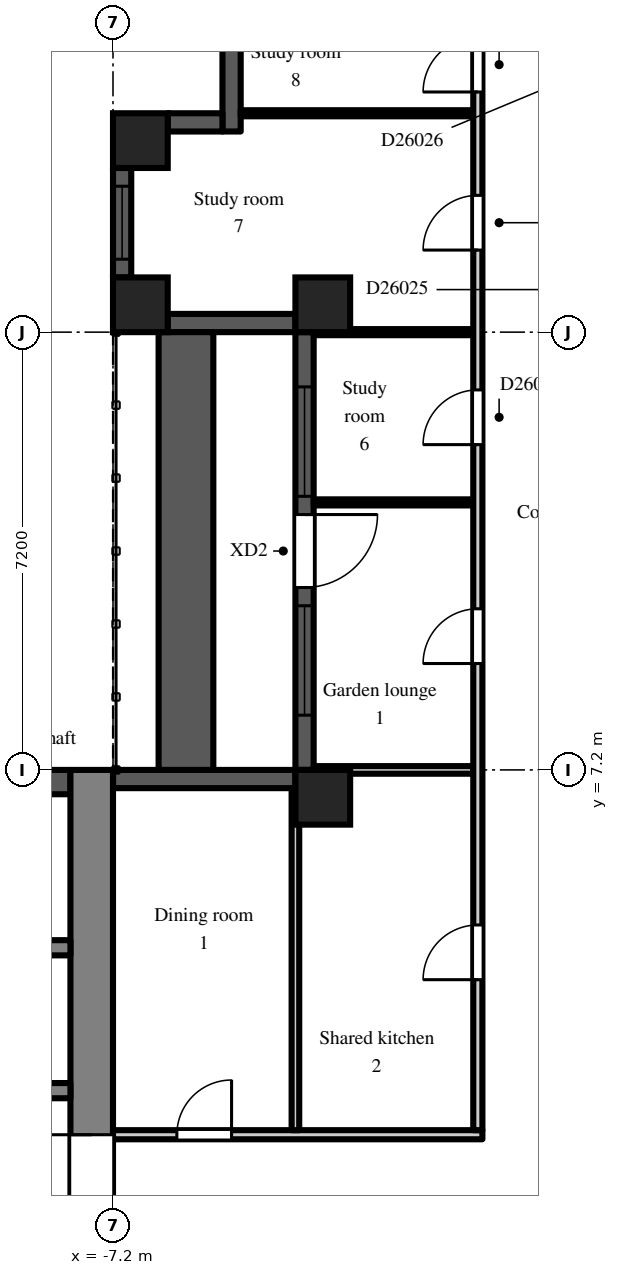
"""IFC4 building model, lengths in metres.
Left out: names, types, materials, properties, quantities, classifications, styles, units other than length and angle.
Written with IfcOpenShell. Run it as: python <this file> out.ifc"""

import sys

from ifc_helpers import new_model, si_unit, direction, frame, frame_2d, origin, origin_2d, place, context, subcontext, project, spatial, rectangle, extrude, element, fill, save


model = new_model("IFC4")
c1 = context("Model", 3, precision=1e-05, world=origin(), true_north=direction((0.0, 1.0)))
c2 = subcontext(c1, "Body", "Model", "MODEL_VIEW")
j1 = project(units=[si_unit("LENGTHUNIT", "METRE"), si_unit("PLANEANGLEUNIT", "RADIAN")], contexts=[c1])
p1 = place(None, origin())
s1 = spatial("IfcSite", under=j1, at=p1, CompositionType="ELEMENT")
p2 = place(p1, origin())
s2 = spatial("IfcBuilding", under=s1, at=p2, CompositionType="ELEMENT")
p3 = place(p2, frame((0.0, 0.0, 179.7)))
s3 = spatial("IfcBuildingStorey", under=s2, at=p3, CompositionType="ELEMENT", Elevation=179.7)
for number, where, z_axis, x_axis in (
    (1, (-6.75, 14.85, 0.0), (0.0, 0.0, 1.0), (1.0, 0.0, 0.0)),
    (2, (-6.75, 17.55, 0.0), (0.0, 0.0, 1.0), (1.0, 0.0, 0.0)),
    (3, (-3.75, 6.75, 0.0), (0.0, 0.0, 1.0), (1.0, 0.0, 0.0)),
    (4, (-3.75, 14.85, 0.0), (0.0, 0.0, 1.0), (1.0, 0.0, 0.0)),
):
    element("IfcColumn", number, at=place(p3, frame(where, z_axis=z_axis, x_axis=x_axis)), inside=s3, PredefinedType="COLUMN", context=c2, shape_type="SweptSolid", body=[
        extrude(rectangle(XDim=0.9, YDim=0.9, at=origin_2d()), origin(), (0.0, 0.0, 1.0), 3.0),
    ])
p4 = place(p3, frame((-5.25, 19.5, 0.0), z_axis=(0.0, 0.0, 1.0), x_axis=(0.0, -1.0, 0.0)))
e5 = element("IfcWall", 5, at=p4, inside=s3, PredefinedType="SOLIDWALL", context=c2, shape_type="SweptSolid", body=[
    extrude(rectangle(XDim=1.8, YDim=0.3, at=frame_2d((0.9, 0.0))), origin(), (0.0, 0.0, 1.0), 2.6),
])
p5 = place(p3, frame((-5.4, 17.85, 0.0), z_axis=(0.0, 0.0, 1.0), x_axis=(-1.0, 0.0, 0.0)))
e6 = element("IfcWall", 6, at=p5, inside=s3, PredefinedType="SOLIDWALL", context=c2, shape_type="SweptSolid", body=[
    extrude(rectangle(XDim=0.9, YDim=0.3, at=frame_2d((0.45, 0.0))), origin(), (0.0, 0.0, 1.0), 2.6),
])
p6 = place(p3, frame((-7.05, 17.1, 0.0), z_axis=(0.0, 0.0, 1.0), x_axis=(0.0, -1.0, 0.0)))
e7 = element("IfcWall", 7, at=p6, inside=s3, PredefinedType="SOLIDWALL", context=c2, shape_type="SweptSolid", body=[
    extrude(rectangle(XDim=1.8, YDim=0.3, at=frame_2d((0.9, 0.0))), origin(), (0.0, 0.0, 1.0), 2.2),
])
p7 = place(p6, frame((0.3, 0.0, 0.2)))
e8 = element("IfcOpeningElement", 8, at=p7, cuts=e7, PredefinedType="OPENING", context=c2, shape_type="SweptSolid", body=[
    extrude(rectangle(XDim=1.2, YDim=1.85, at=frame_2d((0.6, 0.925))), frame((0.0, 0.16, 0.0), z_axis=(0.0, -1.0, 0.0), x_axis=(1.0, 0.0, 0.0)), (0.0, 0.0, 1.0), 0.32),
])
p8 = place(p3, frame((-6.3, 14.55, 0.0), z_axis=(0.0, 0.0, 1.0), x_axis=(1.0, 0.0, 0.0)))
e9 = element("IfcWall", 9, at=p8, inside=s3, PredefinedType="SOLIDWALL", context=c2, shape_type="SweptSolid", body=[
    extrude(rectangle(XDim=2.1, YDim=0.3, at=frame_2d((1.05, 0.0))), origin(), (0.0, 0.0, 1.0), 2.2),
])
p9 = place(p3, frame((-4.05, 14.4, 0.0), z_axis=(0.0, 0.0, 1.0), x_axis=(0.0, -1.0, 0.0)))
e10 = element("IfcWall", 10, at=p9, inside=s3, PredefinedType="SOLIDWALL", context=c2, shape_type="SweptSolid", body=[
    extrude(rectangle(XDim=7.2, YDim=0.3, at=frame_2d((3.6, 0.0))), origin(), (0.0, 0.0, 1.0), 2.2),
])
p10 = place(p9, frame((3.0, 0.0, 0.0)))
e11 = element("IfcOpeningElement", 11, at=p10, cuts=e10, PredefinedType="OPENING", context=c2, shape_type="SweptSolid", body=[
    extrude(rectangle(XDim=1.2, YDim=2.05, at=frame_2d((0.6, 1.025))), frame((0.0, 0.16, 0.0), z_axis=(0.0, -1.0, 0.0), x_axis=(1.0, 0.0, 0.0)), (0.0, 0.0, 1.0), 0.32),
])
p11 = place(p9, frame((0.9, 0.0, 0.2)))
e12 = element("IfcOpeningElement", 12, at=p11, cuts=e10, PredefinedType="OPENING", context=c2, shape_type="SweptSolid", body=[
    extrude(rectangle(XDim=1.8, YDim=1.85, at=frame_2d((0.9, 0.925))), frame((0.0, 0.16, 0.0), z_axis=(0.0, -1.0, 0.0), x_axis=(1.0, 0.0, 0.0)), (0.0, 0.0, 1.0), 0.32),
])
p12 = place(p9, frame((4.5, 0.0, 0.2)))
e13 = element("IfcOpeningElement", 13, at=p12, cuts=e10, PredefinedType="OPENING", context=c2, shape_type="SweptSolid", body=[
    extrude(rectangle(XDim=1.8, YDim=1.85, at=frame_2d((0.9, 0.925))), frame((0.0, 0.16, 0.0), z_axis=(0.0, -1.0, 0.0), x_axis=(1.0, 0.0, 0.0)), (0.0, 0.0, 1.0), 0.32),
])
p13 = place(p3, frame((-4.2, 7.05, 0.0), z_axis=(0.0, 0.0, 1.0), x_axis=(-1.0, 0.0, 0.0)))
e14 = element("IfcWall", 14, at=p13, inside=s3, PredefinedType="SOLIDWALL", context=c2, shape_type="SweptSolid", body=[
    extrude(rectangle(XDim=3.0, YDim=0.3, at=frame_2d((1.5, 0.0))), origin(), (0.0, 0.0, 1.0), 2.2),
])
p14 = place(p3, frame((-6.0, 7.2, 0.0), z_axis=(0.0, 0.0, 1.0), x_axis=(0.0, 1.0, 0.0)))
e15 = element("IfcWall", 15, at=p14, inside=s3, PredefinedType="PARAPET", context=c2, shape_type="SweptSolid", body=[
    extrude(rectangle(XDim=7.2, YDim=0.9, at=frame_2d((3.6, 0.0))), origin(), (0.0, 0.0, 1.0), 0.8),
])
p15 = place(p3, frame((-7.55, -7.2, 0.0), z_axis=(0.0, 0.0, 1.0), x_axis=(0.0, 1.0, 0.0)))
e16 = element("IfcWall", 16, at=p15, inside=s3, PredefinedType="SHEAR", context=c2, shape_type="SweptSolid", body=[
    extrude(rectangle(XDim=14.4, YDim=0.7, at=frame_2d((7.2, 0.0))), origin(), (0.0, 0.0, 1.0), 2.6),
])
p16 = place(p15, frame((6.0, 0.0, 0.0)))
e17 = element("IfcOpeningElement", 17, at=p16, cuts=e16, PredefinedType="OPENING", context=c2, shape_type="SweptSolid", body=[
    extrude(rectangle(XDim=2.4, YDim=2.2, at=frame_2d((1.2, 1.1))), frame((0.0, 0.36, 0.0), z_axis=(0.0, -1.0, 0.0), x_axis=(1.0, 0.0, 0.0)), (0.0, 0.0, 1.0), 0.72),
])
p17 = place(p3, frame((-7.9, 7.0, 0.0), z_axis=(0.0, 0.0, 1.0), x_axis=(-1.0, 0.0, 0.0)))
e18 = element("IfcWall", 18, at=p17, inside=s3, PredefinedType="SHEAR", context=c2, shape_type="SweptSolid", body=[
    extrude(rectangle(XDim=12.95, YDim=0.4, at=frame_2d((6.475, 0.0))), origin(), (0.0, 0.0, 1.0), 2.6),
])
p18 = place(p3, frame((-7.9, 1.925, 0.0), z_axis=(0.0, 0.0, 1.0), x_axis=(-1.0, 0.0, 0.0)))
e19 = element("IfcWall", 19, at=p18, inside=s3, PredefinedType="SHEAR", context=c2, shape_type="SweptSolid", body=[
    extrude(rectangle(XDim=12.95, YDim=0.25, at=frame_2d((6.475, 0.0))), origin(), (0.0, 0.0, 1.0), 2.6),
])
p19 = place(p18, frame((4.825, 0.0, 0.0)))
e20 = element("IfcOpeningElement", 20, at=p19, cuts=e19, PredefinedType="OPENING", context=c2, shape_type="SweptSolid", body=[
    extrude(rectangle(XDim=1.1, YDim=2.1, at=frame_2d((0.55, 1.05))), frame((0.0, 0.135, 0.0), z_axis=(0.0, -1.0, 0.0), x_axis=(1.0, 0.0, 0.0)), (0.0, 0.0, 1.0), 0.27),
])
p20 = place(p18, frame((7.025, 0.0, 0.0)))
e21 = element("IfcOpeningElement", 21, at=p20, cuts=e19, PredefinedType="OPENING", context=c2, shape_type="SweptSolid", body=[
    extrude(rectangle(XDim=1.1, YDim=2.1, at=frame_2d((0.55, 1.05))), frame((0.0, 0.135, 0.0), z_axis=(0.0, -1.0, 0.0), x_axis=(1.0, 0.0, 0.0)), (0.0, 0.0, 1.0), 0.27),
])
p21 = place(p18, frame((9.225, 0.0, 0.0)))
e22 = element("IfcOpeningElement", 22, at=p21, cuts=e19, PredefinedType="OPENING", context=c2, shape_type="SweptSolid", body=[
    extrude(rectangle(XDim=1.1, YDim=2.1, at=frame_2d((0.55, 1.05))), frame((0.0, 0.135, 0.0), z_axis=(0.0, -1.0, 0.0), x_axis=(1.0, 0.0, 0.0)), (0.0, 0.0, 1.0), 0.27),
])
p22 = place(p18, frame((0.525, 0.0, 0.0)))
e23 = element("IfcOpeningElement", 23, at=p22, cuts=e19, PredefinedType="OPENING", context=c2, shape_type="SweptSolid", body=[
    extrude(rectangle(XDim=0.9, YDim=2.1, at=frame_2d((0.45, 1.05))), frame((0.0, 0.135, 0.0), z_axis=(0.0, -1.0, 0.0), x_axis=(1.0, 0.0, 0.0)), (0.0, 0.0, 1.0), 0.27),
])
p23 = place(p18, frame((2.625, 0.0, 0.0)))
e24 = element("IfcOpeningElement", 24, at=p23, cuts=e19, PredefinedType="OPENING", context=c2, shape_type="SweptSolid", body=[
    extrude(rectangle(XDim=1.1, YDim=2.1, at=frame_2d((0.55, 1.05))), frame((0.0, 0.135, 0.0), z_axis=(0.0, -1.0, 0.0), x_axis=(1.0, 0.0, 0.0)), (0.0, 0.0, 1.0), 0.27),
])
p24 = place(p18, frame((11.525, 0.0, 0.0)))
e25 = element("IfcOpeningElement", 25, at=p24, cuts=e19, PredefinedType="OPENING", context=c2, shape_type="SweptSolid", body=[
    extrude(rectangle(XDim=0.9, YDim=2.1, at=frame_2d((0.45, 1.05))), frame((0.0, 0.135, 0.0), z_axis=(0.0, -1.0, 0.0), x_axis=(1.0, 0.0, 0.0)), (0.0, 0.0, 1.0), 0.27),
])
p25 = place(p3, frame((-7.9, 4.275, 0.0), z_axis=(0.0, 0.0, 1.0), x_axis=(-1.0, 0.0, 0.0)))
e26 = element("IfcWall", 26, at=p25, inside=s3, PredefinedType="SHEAR", context=c2, shape_type="SweptSolid", body=[
    extrude(rectangle(XDim=1.95, YDim=0.25, at=frame_2d((0.975, 0.0))), origin(), (0.0, 0.0, 1.0), 2.6),
])
p26 = place(p3, frame((-7.2, 1.2, 0.0), z_axis=(0.0, 0.0, 1.0), x_axis=(1.0, 0.0, 0.0)))
e27 = element("IfcWall", 27, at=p26, inside=s3, PredefinedType="PARTITIONING", context=c2, shape_type="SweptSolid", body=[
    extrude(rectangle(XDim=6.075, YDim=0.15, at=frame_2d((3.038, 0.0))), origin(), (0.0, 0.0, 1.0), 2.6),
])
p27 = place(p26, frame((1.05, 0.0, 0.0)))
e28 = element("IfcOpeningElement", 28, at=p27, cuts=e27, PredefinedType="OPENING", context=c2, shape_type="SweptSolid", body=[
    extrude(rectangle(XDim=0.9, YDim=2.1, at=frame_2d((0.45, 1.05))), frame((0.0, 0.085, 0.0), z_axis=(0.0, -1.0, 0.0), x_axis=(1.0, 0.0, 0.0)), (0.0, 0.0, 1.0), 0.17),
])
p28 = place(p3, frame((-5.1, 18.0, 0.0), z_axis=(0.0, 0.0, 1.0), x_axis=(1.0, 0.0, 0.0)))
e29 = element("IfcWall", 29, at=p28, inside=s3, PredefinedType="PARTITIONING", context=c2, shape_type="SweptSolid", body=[
    extrude(rectangle(XDim=3.825, YDim=0.1, at=frame_2d((1.913, 0.0))), origin(), (0.0, 0.0, 1.0), 2.6),
])
p29 = place(p3, frame((-4.2, 1.275, 0.0), z_axis=(0.0, 0.0, 1.0), x_axis=(0.0, 1.0, 0.0)))
e30 = element("IfcWall", 30, at=p29, inside=s3, PredefinedType="PARTITIONING", context=c2, shape_type="SweptSolid", body=[
    extrude(rectangle(XDim=5.625, YDim=0.125, at=frame_2d((2.812, 0.0))), origin(), (0.0, 0.0, 1.0), 2.6),
])
p30 = place(p3, frame((-3.9, 7.2, 0.0), z_axis=(0.0, 0.0, 1.0), x_axis=(1.0, 0.0, 0.0)))
e31 = element("IfcWall", 31, at=p30, inside=s3, PredefinedType="PARTITIONING", context=c2, shape_type="SweptSolid", body=[
    extrude(rectangle(XDim=2.625, YDim=0.125, at=frame_2d((1.312, 0.0))), origin(), (0.0, 0.0, 1.0), 2.6),
])
for number, where, z_axis, x_axis in (
    (32, (-3.9, 11.6, 0.0), (0.0, 0.0, 1.0), (1.0, 0.0, 0.0)),
    (33, (-3.9, 14.4, 0.0), (0.0, 0.0, 1.0), (1.0, 0.0, 0.0)),
):
    element("IfcWall", number, at=place(p3, frame(where, z_axis=z_axis, x_axis=x_axis)), inside=s3, PredefinedType="PARTITIONING", context=c2, shape_type="SweptSolid", body=[
        extrude(rectangle(XDim=2.625, YDim=0.1, at=frame_2d((1.312, 0.0))), origin(), (0.0, 0.0, 1.0), 2.6),
    ])
p31 = place(p3, frame((-1.2, 1.275, 0.0), z_axis=(0.0, 0.0, 1.0), x_axis=(0.0, 1.0, 0.0)))
e34 = element("IfcWall", 34, at=p31, inside=s3, PredefinedType="PARTITIONING", context=c2, shape_type="SweptSolid", body=[
    extrude(rectangle(XDim=18.25, YDim=0.15, at=frame_2d((9.125, 0.0))), origin(), (0.0, 0.0, 1.0), 2.6),
])
p32 = place(p31, frame((2.475, 0.0, 0.0)))
e35 = element("IfcOpeningElement", 35, at=p32, cuts=e34, PredefinedType="OPENING", context=c2, shape_type="SweptSolid", body=[
    extrude(rectangle(XDim=0.9, YDim=2.1, at=frame_2d((0.45, 1.05))), frame((0.0, 0.085, 0.0), z_axis=(0.0, -1.0, 0.0), x_axis=(1.0, 0.0, 0.0)), (0.0, 0.0, 1.0), 0.17),
])
p33 = place(p31, frame((11.275, 0.0, 0.0)))
e36 = element("IfcOpeningElement", 36, at=p33, cuts=e34, PredefinedType="OPENING", context=c2, shape_type="SweptSolid", body=[
    extrude(rectangle(XDim=0.9, YDim=2.1, at=frame_2d((0.45, 1.05))), frame((0.0, 0.085, 0.0), z_axis=(0.0, -1.0, 0.0), x_axis=(1.0, 0.0, 0.0)), (0.0, 0.0, 1.0), 0.17),
])
p34 = place(p31, frame((7.675, 0.0, 0.0)))
e37 = element("IfcOpeningElement", 37, at=p34, cuts=e34, PredefinedType="OPENING", context=c2, shape_type="SweptSolid", body=[
    extrude(rectangle(XDim=0.9, YDim=2.1, at=frame_2d((0.45, 1.05))), frame((0.0, 0.085, 0.0), z_axis=(0.0, -1.0, 0.0), x_axis=(1.0, 0.0, 0.0)), (0.0, 0.0, 1.0), 0.17),
])
p35 = place(p31, frame((14.475, 0.0, 0.0)))
e38 = element("IfcOpeningElement", 38, at=p35, cuts=e34, PredefinedType="OPENING", context=c2, shape_type="SweptSolid", body=[
    extrude(rectangle(XDim=0.9, YDim=2.1, at=frame_2d((0.45, 1.05))), frame((0.0, 0.085, 0.0), z_axis=(0.0, -1.0, 0.0), x_axis=(1.0, 0.0, 0.0)), (0.0, 0.0, 1.0), 0.17),
])
p36 = place(p31, frame((17.075, 0.0, 0.0)))
e39 = element("IfcOpeningElement", 39, at=p36, cuts=e34, PredefinedType="OPENING", context=c2, shape_type="SweptSolid", body=[
    extrude(rectangle(XDim=0.9, YDim=2.1, at=frame_2d((0.45, 1.05))), frame((0.0, 0.085, 0.0), z_axis=(0.0, -1.0, 0.0), x_axis=(1.0, 0.0, 0.0)), (0.0, 0.0, 1.0), 0.17),
])
p37 = place(p7, origin())
e40 = element("IfcWindow", 40, at=p37, inside=s3, PartitioningType="SINGLE_PANEL", PredefinedType="WINDOW", context=c2, shape_type="SweptSolid", body=[
    extrude(rectangle(XDim=1.2, YDim=1.85, at=frame_2d((0.6, 0.925))), frame((0.0, 0.03, 0.0), z_axis=(0.0, -1.0, 0.0), x_axis=(1.0, 0.0, 0.0)), (0.0, 0.0, 1.0), 0.06),
])
fill(e8, e40)
p38 = place(p10, origin())
e41 = element("IfcDoor", 41, at=p38, inside=s3, OperationType="SINGLE_SWING_LEFT", PredefinedType="DOOR", context=c2, shape_type="SweptSolid", body=[
    extrude(rectangle(XDim=1.2, YDim=2.05, at=frame_2d((0.6, 1.025))), frame((0.0, 0.025, 0.0), z_axis=(0.0, -1.0, 0.0), x_axis=(1.0, 0.0, 0.0)), (0.0, 0.0, 1.0), 0.05),
])
fill(e11, e41)
p39 = place(p11, origin())
e42 = element("IfcWindow", 42, at=p39, inside=s3, PartitioningType="SINGLE_PANEL", PredefinedType="WINDOW", context=c2, shape_type="SweptSolid", body=[
    extrude(rectangle(XDim=1.8, YDim=1.85, at=frame_2d((0.9, 0.925))), frame((0.0, 0.03, 0.0), z_axis=(0.0, -1.0, 0.0), x_axis=(1.0, 0.0, 0.0)), (0.0, 0.0, 1.0), 0.06),
])
fill(e12, e42)
p40 = place(p12, origin())
e43 = element("IfcWindow", 43, at=p40, inside=s3, PartitioningType="SINGLE_PANEL", PredefinedType="WINDOW", context=c2, shape_type="SweptSolid", body=[
    extrude(rectangle(XDim=1.8, YDim=1.85, at=frame_2d((0.9, 0.925))), frame((0.0, 0.03, 0.0), z_axis=(0.0, -1.0, 0.0), x_axis=(1.0, 0.0, 0.0)), (0.0, 0.0, 1.0), 0.06),
])
fill(e13, e43)
p41 = place(p16, origin())
e44 = element("IfcDoor", 44, at=p41, inside=s3, OperationType="DOUBLE_DOOR_DOUBLE_SWING", PredefinedType="DOOR", context=c2, shape_type="SweptSolid", body=[
    extrude(rectangle(XDim=2.4, YDim=2.2, at=frame_2d((1.2, 1.1))), frame((0.0, 0.025, 0.0), z_axis=(0.0, -1.0, 0.0), x_axis=(1.0, 0.0, 0.0)), (0.0, 0.0, 1.0), 0.05),
])
fill(e17, e44)
p42 = place(p32, origin())
e45 = element("IfcDoor", 45, at=p42, inside=s3, OperationType="SINGLE_SWING_LEFT", PredefinedType="DOOR", context=c2, shape_type="SweptSolid", body=[
    extrude(rectangle(XDim=0.9, YDim=2.1, at=frame_2d((0.45, 1.05))), frame((0.0, 0.025, 0.0), z_axis=(0.0, -1.0, 0.0), x_axis=(1.0, 0.0, 0.0)), (0.0, 0.0, 1.0), 0.05),
])
fill(e35, e45)
p43 = place(p27, origin())
e46 = element("IfcDoor", 46, at=p43, inside=s3, OperationType="SINGLE_SWING_RIGHT", PredefinedType="DOOR", context=c2, shape_type="SweptSolid", body=[
    extrude(rectangle(XDim=0.9, YDim=2.1, at=frame_2d((0.45, 1.05))), frame((0.0, 0.025, 0.0), z_axis=(0.0, -1.0, 0.0), x_axis=(1.0, 0.0, 0.0)), (0.0, 0.0, 1.0), 0.05),
])
fill(e28, e46)
p44 = place(p33, origin())
e47 = element("IfcDoor", 47, at=p44, inside=s3, OperationType="SINGLE_SWING_LEFT", PredefinedType="DOOR", context=c2, shape_type="SweptSolid", body=[
    extrude(rectangle(XDim=0.9, YDim=2.1, at=frame_2d((0.45, 1.05))), frame((0.0, 0.025, 0.0), z_axis=(0.0, -1.0, 0.0), x_axis=(1.0, 0.0, 0.0)), (0.0, 0.0, 1.0), 0.05),
])
fill(e36, e47)
p45 = place(p34, origin())
e48 = element("IfcDoor", 48, at=p45, inside=s3, OperationType="SINGLE_SWING_LEFT", PredefinedType="DOOR", context=c2, shape_type="SweptSolid", body=[
    extrude(rectangle(XDim=0.9, YDim=2.1, at=frame_2d((0.45, 1.05))), frame((0.0, 0.025, 0.0), z_axis=(0.0, -1.0, 0.0), x_axis=(1.0, 0.0, 0.0)), (0.0, 0.0, 1.0), 0.05),
])
fill(e37, e48)
p46 = place(p35, origin())
e49 = element("IfcDoor", 49, at=p46, inside=s3, OperationType="SINGLE_SWING_LEFT", PredefinedType="DOOR", context=c2, shape_type="SweptSolid", body=[
    extrude(rectangle(XDim=0.9, YDim=2.1, at=frame_2d((0.45, 1.05))), frame((0.0, 0.025, 0.0), z_axis=(0.0, -1.0, 0.0), x_axis=(1.0, 0.0, 0.0)), (0.0, 0.0, 1.0), 0.05),
])
fill(e38, e49)
p47 = place(p36, origin())
e50 = element("IfcDoor", 50, at=p47, inside=s3, OperationType="SINGLE_SWING_LEFT", PredefinedType="DOOR", context=c2, shape_type="SweptSolid", body=[
    extrude(rectangle(XDim=0.9, YDim=2.1, at=frame_2d((0.45, 1.05))), frame((0.0, 0.025, 0.0), z_axis=(0.0, -1.0, 0.0), x_axis=(1.0, 0.0, 0.0)), (0.0, 0.0, 1.0), 0.05),
])
fill(e39, e50)
save(model, sys.argv[1])
